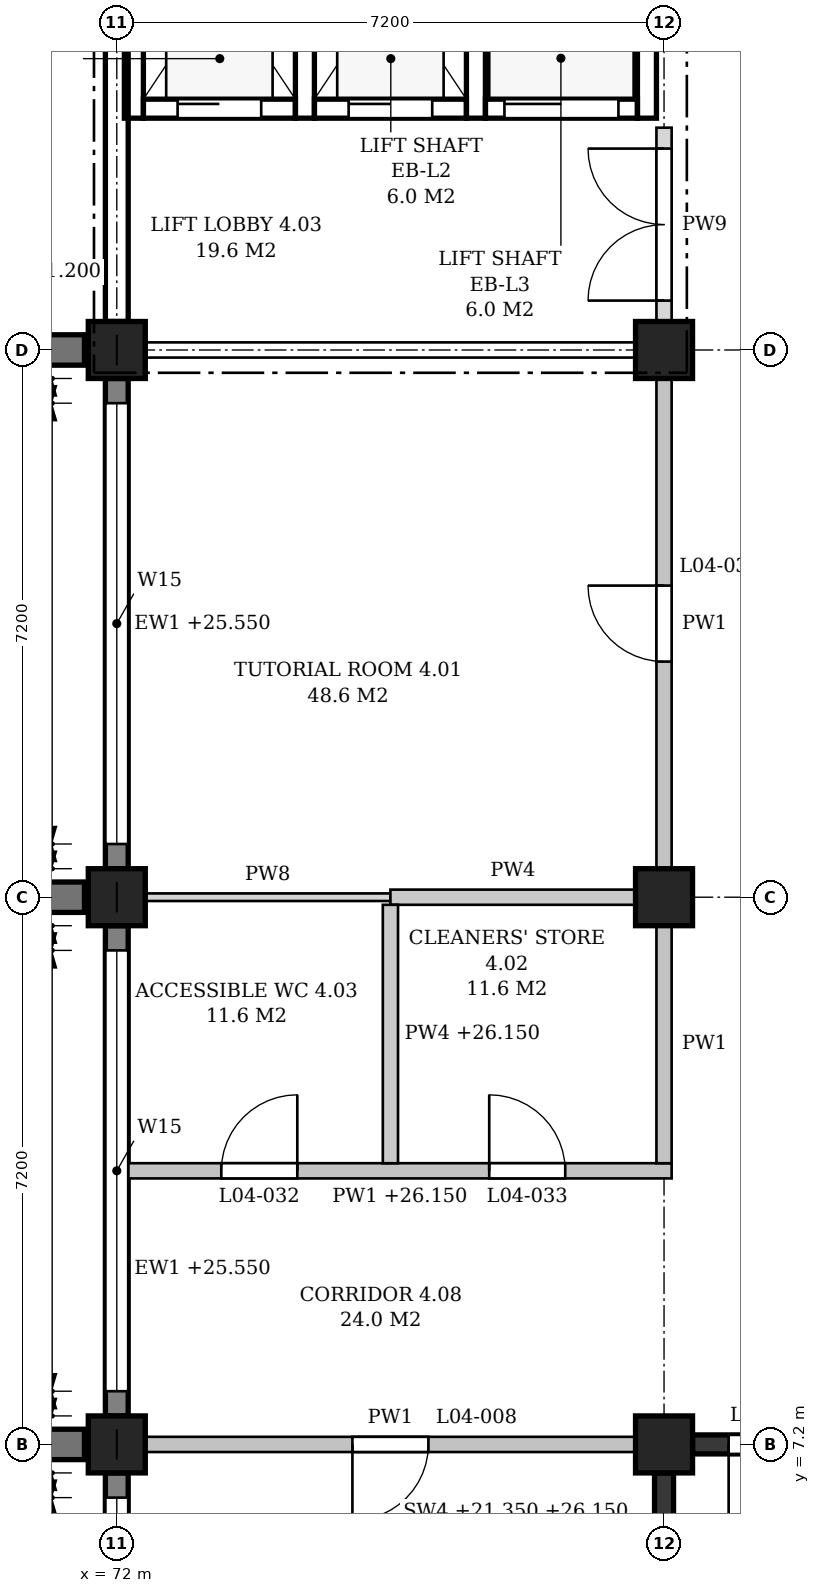
"""IFC4 building model, lengths in metres.
Left out: names, types, materials, properties, quantities, classifications, styles, units other than length and angle.
Written with IfcOpenShell. Run it as: python <this file> out.ifc"""

import sys

from ifc_helpers import new_model, si_unit, direction, frame, frame_2d, origin, origin_2d, place, context, subcontext, project, spatial, polyline, rectangle, outline, extrude, element, fill, save


model = new_model("IFC4")
c1 = context("Model", 3, precision=1e-05, world=origin(), true_north=direction((0.0, 1.0)))
c2 = subcontext(c1, "Body", "Model", "MODEL_VIEW")
j1 = project(units=[si_unit("LENGTHUNIT", "METRE"), si_unit("PLANEANGLEUNIT", "RADIAN")], contexts=[c1])
p1 = place(None, origin())
s1 = spatial("IfcSite", under=j1, at=p1, CompositionType="ELEMENT")
p2 = place(p1, origin())
s2 = spatial("IfcBuilding", under=s1, at=p2, CompositionType="ELEMENT")
p3 = place(p2, frame((0.0, 0.0, 21.6)))
s3 = spatial("IfcBuildingStorey", under=s2, at=p3, CompositionType="ELEMENT", Elevation=21.6)
for number, where, z_axis, x_axis in (
    (1, (72.0, 7.2, 0.0), (0.0, 0.0, 1.0), (1.0, 0.0, 0.0)),
    (2, (72.0, 14.4, 0.0), (0.0, 0.0, 1.0), (1.0, 0.0, 0.0)),
    (3, (72.0, 21.6, 0.0), (0.0, 0.0, 1.0), (1.0, 0.0, 0.0)),
    (4, (79.2, 7.2, 0.0), (0.0, 0.0, 1.0), (1.0, 0.0, 0.0)),
    (5, (79.2, 14.4, 0.0), (0.0, 0.0, 1.0), (1.0, 0.0, 0.0)),
    (6, (79.2, 21.6, 0.0), (0.0, 0.0, 1.0), (1.0, 0.0, 0.0)),
):
    element("IfcColumn", number, at=place(p3, frame(where, z_axis=z_axis, x_axis=x_axis)), inside=s3, PredefinedType="COLUMN", context=c2, shape_type="SweptSolid", body=[
        extrude(rectangle(XDim=0.75, YDim=0.75, at=origin_2d()), origin(), (0.0, 0.0, 1.0), 4.8),
    ])
p4 = place(p3, frame((72.0, 0.375, 0.0), z_axis=(0.0, 0.0, 1.0), x_axis=(0.0, 1.0, 0.0)))
e7 = element("IfcWall", 7, at=p4, inside=s3, PredefinedType="STANDARD", context=c2, shape_type="SweptSolid", body=[
    extrude(rectangle(XDim=6.45, YDim=0.3, at=frame_2d((3.225, 0.0))), origin(), (0.0, 0.0, 1.0), 3.95),
])
p5 = place(p4, frame((0.325, 0.0, 0.9)))
e8 = element("IfcOpeningElement", 8, at=p5, cuts=e7, PredefinedType="OPENING", context=c2, shape_type="SweptSolid", body=[
    extrude(outline(polyline([(0.0, 0.0), (5.8, 0.0), (5.8, 1.0), (2.9, 2.5), (0.0, 1.0), (0.0, 0.0)])), frame((0.0, 0.16, 0.0), z_axis=(0.0, -1.0, 0.0), x_axis=(1.0, 0.0, 0.0)), (0.0, 0.0, 1.0), 0.32),
])
p6 = place(p3, frame((72.0, 7.575, 0.0), z_axis=(0.0, 0.0, 1.0), x_axis=(0.0, 1.0, 0.0)))
e9 = element("IfcWall", 9, at=p6, inside=s3, PredefinedType="STANDARD", context=c2, shape_type="SweptSolid", body=[
    extrude(rectangle(XDim=6.45, YDim=0.3, at=frame_2d((3.225, 0.0))), origin(), (0.0, 0.0, 1.0), 3.95),
])
p7 = place(p6, frame((0.325, 0.0, 0.9)))
e10 = element("IfcOpeningElement", 10, at=p7, cuts=e9, PredefinedType="OPENING", context=c2, shape_type="SweptSolid", body=[
    extrude(outline(polyline([(0.0, 0.0), (5.8, 0.0), (5.8, 1.0), (2.9, 2.5), (0.0, 1.0), (0.0, 0.0)])), frame((0.0, 0.16, 0.0), z_axis=(0.0, -1.0, 0.0), x_axis=(1.0, 0.0, 0.0)), (0.0, 0.0, 1.0), 0.32),
])
p8 = place(p3, frame((72.0, 14.775, 0.0), z_axis=(0.0, 0.0, 1.0), x_axis=(0.0, 1.0, 0.0)))
e11 = element("IfcWall", 11, at=p8, inside=s3, PredefinedType="STANDARD", context=c2, shape_type="SweptSolid", body=[
    extrude(rectangle(XDim=6.45, YDim=0.3, at=frame_2d((3.225, 0.0))), origin(), (0.0, 0.0, 1.0), 3.95),
])
p9 = place(p8, frame((0.325, 0.0, 0.9)))
e12 = element("IfcOpeningElement", 12, at=p9, cuts=e11, PredefinedType="OPENING", context=c2, shape_type="SweptSolid", body=[
    extrude(outline(polyline([(0.0, 0.0), (5.8, 0.0), (5.8, 1.0), (2.9, 2.5), (0.0, 1.0), (0.0, 0.0)])), frame((0.0, 0.16, 0.0), z_axis=(0.0, -1.0, 0.0), x_axis=(1.0, 0.0, 0.0)), (0.0, 0.0, 1.0), 0.32),
])
p10 = place(p3, frame((72.0, 21.975, 0.0), z_axis=(0.0, 0.0, 1.0), x_axis=(0.0, 1.0, 0.0)))
e13 = element("IfcWall", 13, at=p10, inside=s3, PredefinedType="STANDARD", context=c2, shape_type="SweptSolid", body=[
    extrude(rectangle(XDim=6.45, YDim=0.3, at=frame_2d((3.225, 0.0))), origin(), (0.0, 0.0, 1.0), 3.95),
])
for number, where, z_axis, x_axis in (
    (14, (71.575, 7.2, -0.25), (0.0, 0.0, 1.0), (-1.0, 0.0, 0.0)),
    (15, (71.575, 14.4, -0.25), (0.0, 0.0, 1.0), (-1.0, 0.0, 0.0)),
    (16, (71.575, 21.6, -0.25), (0.0, 0.0, 1.0), (-1.0, 0.0, 0.0)),
):
    element("IfcWall", number, at=place(p3, frame(where, z_axis=z_axis, x_axis=x_axis)), inside=s3, PredefinedType="POLYGONAL", context=c2, shape_type="SweptSolid", body=[
        extrude(outline(polyline([(0.6, 0.0), (0.6, 9.175), (0.15, 9.85), (0.0, 9.85), (0.0, 0.0), (0.6, 0.0)])), frame((0.0, 0.2, 0.0), z_axis=(0.0, -1.0, 0.0), x_axis=(1.0, 0.0, 0.0)), (0.0, 0.0, 1.0), 0.4),
    ])
p11 = place(p3, frame((79.575, 7.2, 0.0), z_axis=(0.0, 0.0, 1.0), x_axis=(1.0, 0.0, 0.0)))
e17 = element("IfcWall", 17, at=p11, inside=s3, PredefinedType="SHEAR", context=c2, shape_type="SweptSolid", body=[
    extrude(rectangle(XDim=6.45, YDim=0.25, at=frame_2d((3.225, 0.0))), origin(), (0.0, 0.0, 1.0), 3.8),
])
p12 = place(p11, frame((0.475, 0.0, 0.0)))
e18 = element("IfcOpeningElement", 18, at=p12, cuts=e17, PredefinedType="OPENING", context=c2, shape_type="SweptSolid", body=[
    extrude(rectangle(XDim=1.1, YDim=2.1, at=frame_2d((0.55, 1.05))), frame((0.0, 0.135, 0.0), z_axis=(0.0, -1.0, 0.0), x_axis=(1.0, 0.0, 0.0)), (0.0, 0.0, 1.0), 0.27),
])
p13 = place(p3, frame((79.2, 0.375, 0.0), z_axis=(0.0, 0.0, 1.0), x_axis=(0.0, 1.0, 0.0)))
e19 = element("IfcWall", 19, at=p13, inside=s3, PredefinedType="SHEAR", context=c2, shape_type="SweptSolid", body=[
    extrude(rectangle(XDim=6.45, YDim=0.25, at=frame_2d((3.225, 0.0))), origin(), (0.0, 0.0, 1.0), 3.8),
])
p14 = place(p3, frame((72.225, 24.65, -0.25), z_axis=(0.0, 0.0, 1.0), x_axis=(0.0, 1.0, 0.0)))
e20 = element("IfcWall", 20, at=p14, inside=s3, PredefinedType="SHEAR", context=c2, shape_type="SweptSolid", body=[
    extrude(rectangle(XDim=3.775, YDim=0.25, at=frame_2d((1.888, 0.0))), origin(), (0.0, 0.0, 1.0), 4.8),
])
for number, where, z_axis, x_axis in (
    (21, (74.475, 24.65, -0.25), (0.0, 0.0, 1.0), (0.0, 1.0, 0.0)),
    (22, (76.725, 24.65, -0.25), (0.0, 0.0, 1.0), (0.0, 1.0, 0.0)),
):
    element("IfcWall", number, at=place(p3, frame(where, z_axis=z_axis, x_axis=x_axis)), inside=s3, PredefinedType="SHEAR", context=c2, shape_type="SweptSolid", body=[
        extrude(rectangle(XDim=3.5, YDim=0.25, at=frame_2d((1.75, 0.0))), origin(), (0.0, 0.0, 1.0), 4.8),
    ])
p15 = place(p3, frame((78.975, 24.65, -0.25), z_axis=(0.0, 0.0, 1.0), x_axis=(0.0, 1.0, 0.0)))
e23 = element("IfcWall", 23, at=p15, inside=s3, PredefinedType="SHEAR", context=c2, shape_type="SweptSolid", body=[
    extrude(rectangle(XDim=3.775, YDim=0.25, at=frame_2d((1.888, 0.0))), origin(), (0.0, 0.0, 1.0), 4.8),
])
p16 = place(p3, frame((72.35, 24.775, -0.25), z_axis=(0.0, 0.0, 1.0), x_axis=(1.0, 0.0, 0.0)))
e24 = element("IfcWall", 24, at=p16, inside=s3, PredefinedType="SHEAR", context=c2, shape_type="SweptSolid", body=[
    extrude(rectangle(XDim=2.0, YDim=0.25, at=frame_2d((1.0, 0.0))), origin(), (0.0, 0.0, 1.0), 4.8),
])
p17 = place(p16, frame((0.45, 0.0, 0.25)))
e25 = element("IfcOpeningElement", 25, at=p17, cuts=e24, PredefinedType="OPENING", context=c2, shape_type="SweptSolid", body=[
    extrude(rectangle(XDim=1.1, YDim=2.1, at=frame_2d((0.55, 1.05))), frame((0.0, 0.135, 0.0), z_axis=(0.0, -1.0, 0.0), x_axis=(1.0, 0.0, 0.0)), (0.0, 0.0, 1.0), 0.27),
])
p18 = place(p3, frame((74.6, 24.775, -0.25), z_axis=(0.0, 0.0, 1.0), x_axis=(1.0, 0.0, 0.0)))
e26 = element("IfcWall", 26, at=p18, inside=s3, PredefinedType="SHEAR", context=c2, shape_type="SweptSolid", body=[
    extrude(rectangle(XDim=2.0, YDim=0.25, at=frame_2d((1.0, 0.0))), origin(), (0.0, 0.0, 1.0), 4.8),
])
p19 = place(p18, frame((0.45, 0.0, 0.25)))
e27 = element("IfcOpeningElement", 27, at=p19, cuts=e26, PredefinedType="OPENING", context=c2, shape_type="SweptSolid", body=[
    extrude(rectangle(XDim=1.1, YDim=2.1, at=frame_2d((0.55, 1.05))), frame((0.0, 0.135, 0.0), z_axis=(0.0, -1.0, 0.0), x_axis=(1.0, 0.0, 0.0)), (0.0, 0.0, 1.0), 0.27),
])
p20 = place(p3, frame((76.85, 24.775, -0.25), z_axis=(0.0, 0.0, 1.0), x_axis=(1.0, 0.0, 0.0)))
e28 = element("IfcWall", 28, at=p20, inside=s3, PredefinedType="SHEAR", context=c2, shape_type="SweptSolid", body=[
    extrude(rectangle(XDim=2.0, YDim=0.25, at=frame_2d((1.0, 0.0))), origin(), (0.0, 0.0, 1.0), 4.8),
])
p21 = place(p20, frame((0.25, 0.0, 0.25)))
e29 = element("IfcOpeningElement", 29, at=p21, cuts=e28, PredefinedType="OPENING", context=c2, shape_type="SweptSolid", body=[
    extrude(rectangle(XDim=1.5, YDim=2.1, at=frame_2d((0.75, 1.05))), frame((0.0, 0.135, 0.0), z_axis=(0.0, -1.0, 0.0), x_axis=(1.0, 0.0, 0.0)), (0.0, 0.0, 1.0), 0.27),
])
p22 = place(p3, frame((72.375, 7.2, 0.0), z_axis=(0.0, 0.0, 1.0), x_axis=(1.0, 0.0, 0.0)))
e30 = element("IfcWall", 30, at=p22, inside=s3, PredefinedType="PARTITIONING", context=c2, shape_type="SweptSolid", body=[
    extrude(rectangle(XDim=6.45, YDim=0.2, at=frame_2d((3.225, 0.0))), origin(), (0.0, 0.0, 1.0), 3.8),
])
p23 = place(p22, frame((2.725, 0.0, 0.0)))
e31 = element("IfcOpeningElement", 31, at=p23, cuts=e30, PredefinedType="OPENING", context=c2, shape_type="SweptSolid", body=[
    extrude(rectangle(XDim=1.0, YDim=2.1, at=frame_2d((0.5, 1.05))), frame((0.0, 0.11, 0.0), z_axis=(0.0, -1.0, 0.0), x_axis=(1.0, 0.0, 0.0)), (0.0, 0.0, 1.0), 0.22),
])
p24 = place(p3, frame((72.15, 10.8, 0.0), z_axis=(0.0, 0.0, 1.0), x_axis=(1.0, 0.0, 0.0)))
e32 = element("IfcWall", 32, at=p24, inside=s3, PredefinedType="PARTITIONING", context=c2, shape_type="SweptSolid", body=[
    extrude(outline(polyline([(0.0, 0.0), (7.15, 0.0), (7.15, 3.8), (6.8, 3.8), (6.8, 4.55), (0.1, 4.55), (0.1, 3.95), (0.0, 3.95), (0.0, 0.0)])), frame((0.0, 0.1, 0.0), z_axis=(0.0, -1.0, 0.0), x_axis=(1.0, 0.0, 0.0)), (0.0, 0.0, 1.0), 0.2),
])
p25 = place(p24, frame((1.225, 0.0, 0.0)))
e33 = element("IfcOpeningElement", 33, at=p25, cuts=e32, PredefinedType="OPENING", context=c2, shape_type="SweptSolid", body=[
    extrude(rectangle(XDim=1.0, YDim=2.1, at=frame_2d((0.5, 1.05))), frame((0.0, 0.11, 0.0), z_axis=(0.0, -1.0, 0.0), x_axis=(1.0, 0.0, 0.0)), (0.0, 0.0, 1.0), 0.22),
])
p26 = place(p24, frame((4.75, 0.0, 0.0)))
e34 = element("IfcOpeningElement", 34, at=p26, cuts=e32, PredefinedType="OPENING", context=c2, shape_type="SweptSolid", body=[
    extrude(rectangle(XDim=1.0, YDim=2.1, at=frame_2d((0.5, 1.05))), frame((0.0, 0.11, 0.0), z_axis=(0.0, -1.0, 0.0), x_axis=(1.0, 0.0, 0.0)), (0.0, 0.0, 1.0), 0.22),
])
p27 = place(p3, frame((72.375, 14.4, 0.0), z_axis=(0.0, 0.0, 1.0), x_axis=(1.0, 0.0, 0.0)))
e35 = element("IfcWall", 35, at=p27, inside=s3, PredefinedType="PARTITIONING", context=c2, shape_type="SweptSolid", body=[
    extrude(rectangle(XDim=3.225, YDim=0.1, at=frame_2d((1.613, 0.0))), origin(), (0.0, 0.0, 1.0), 3.8),
])
p28 = place(p3, frame((75.6, 14.4, 0.0), z_axis=(0.0, 0.0, 1.0), x_axis=(1.0, 0.0, 0.0)))
e36 = element("IfcWall", 36, at=p28, inside=s3, PredefinedType="PARTITIONING", context=c2, shape_type="SweptSolid", body=[
    extrude(rectangle(XDim=3.225, YDim=0.2, at=frame_2d((1.612, 0.0))), origin(), (0.0, 0.0, 1.0), 3.8),
])
p29 = place(p3, frame((72.375, 21.6, 0.0), z_axis=(0.0, 0.0, 1.0), x_axis=(1.0, 0.0, 0.0)))
e37 = element("IfcWall", 37, at=p29, inside=s3, PredefinedType="PARTITIONING", context=c2, shape_type="SweptSolid", body=[
    extrude(rectangle(XDim=6.45, YDim=0.2, at=frame_2d((3.225, 0.0))), origin(), (0.0, 0.0, 1.0), 3.8),
])
p30 = place(p3, frame((75.6, 10.9, 0.0), z_axis=(0.0, 0.0, 1.0), x_axis=(0.0, 1.0, 0.0)))
e38 = element("IfcWall", 38, at=p30, inside=s3, PredefinedType="PARTITIONING", context=c2, shape_type="SweptSolid", body=[
    extrude(outline(polyline([(0.0, 0.0), (3.4, 0.0), (3.4, 3.8), (3.25, 3.8), (3.25, 4.55), (0.0, 4.55), (0.0, 0.0)])), frame((0.0, 0.1, 0.0), z_axis=(0.0, -1.0, 0.0), x_axis=(1.0, 0.0, 0.0)), (0.0, 0.0, 1.0), 0.2),
])
p31 = place(p3, frame((79.2, 10.9, 0.0), z_axis=(0.0, 0.0, 1.0), x_axis=(0.0, 1.0, 0.0)))
e39 = element("IfcWall", 39, at=p31, inside=s3, PredefinedType="PARTITIONING", context=c2, shape_type="SweptSolid", body=[
    extrude(rectangle(XDim=3.125, YDim=0.2, at=frame_2d((1.562, 0.0))), origin(), (0.0, 0.0, 1.0), 3.8),
])
p32 = place(p3, frame((79.2, 14.775, 0.0), z_axis=(0.0, 0.0, 1.0), x_axis=(0.0, 1.0, 0.0)))
e40 = element("IfcWall", 40, at=p32, inside=s3, PredefinedType="PARTITIONING", context=c2, shape_type="SweptSolid", body=[
    extrude(rectangle(XDim=6.45, YDim=0.2, at=frame_2d((3.225, 0.0))), origin(), (0.0, 0.0, 1.0), 3.8),
])
p33 = place(p32, frame((2.725, 0.0, 0.0)))
e41 = element("IfcOpeningElement", 41, at=p33, cuts=e40, PredefinedType="OPENING", context=c2, shape_type="SweptSolid", body=[
    extrude(rectangle(XDim=1.0, YDim=2.1, at=frame_2d((0.5, 1.05))), frame((0.0, 0.11, 0.0), z_axis=(0.0, -1.0, 0.0), x_axis=(1.0, 0.0, 0.0)), (0.0, 0.0, 1.0), 0.22),
])
p34 = place(p3, frame((79.2, 21.975, 0.0), z_axis=(0.0, 0.0, 1.0), x_axis=(0.0, 1.0, 0.0)))
e42 = element("IfcWall", 42, at=p34, inside=s3, PredefinedType="PARTITIONING", context=c2, shape_type="SweptSolid", body=[
    extrude(rectangle(XDim=2.55, YDim=0.2, at=frame_2d((1.275, 0.0))), origin(), (0.0, 0.0, 1.0), 3.8),
])
p35 = place(p34, frame((0.275, 0.0, 0.0)))
e43 = element("IfcOpeningElement", 43, at=p35, cuts=e42, PredefinedType="OPENING", context=c2, shape_type="SweptSolid", body=[
    extrude(rectangle(XDim=2.0, YDim=2.4, at=frame_2d((1.0, 1.2))), frame((0.0, 0.11, 0.0), z_axis=(0.0, -1.0, 0.0), x_axis=(1.0, 0.0, 0.0)), (0.0, 0.0, 1.0), 0.22),
])
p36 = place(p5, origin())
e44 = element("IfcWindow", 44, at=p36, inside=s3, PartitioningType="TRIPLE_PANEL_VERTICAL", PredefinedType="WINDOW", context=c2, shape_type="SweptSolid", body=[
    extrude(outline(polyline([(0.0, 0.0), (5.8, 0.0), (5.8, 1.0), (2.9, 2.5), (0.0, 1.0), (0.0, 0.0)])), frame((0.0, 0.03, 0.0), z_axis=(0.0, -1.0, 0.0), x_axis=(1.0, 0.0, 0.0)), (0.0, 0.0, 1.0), 0.06),
])
fill(e8, e44)
p37 = place(p7, origin())
e45 = element("IfcWindow", 45, at=p37, inside=s3, PartitioningType="TRIPLE_PANEL_VERTICAL", PredefinedType="WINDOW", context=c2, shape_type="SweptSolid", body=[
    extrude(outline(polyline([(0.0, 0.0), (5.8, 0.0), (5.8, 1.0), (2.9, 2.5), (0.0, 1.0), (0.0, 0.0)])), frame((0.0, 0.03, 0.0), z_axis=(0.0, -1.0, 0.0), x_axis=(1.0, 0.0, 0.0)), (0.0, 0.0, 1.0), 0.06),
])
fill(e10, e45)
p38 = place(p9, origin())
e46 = element("IfcWindow", 46, at=p38, inside=s3, PartitioningType="TRIPLE_PANEL_VERTICAL", PredefinedType="WINDOW", context=c2, shape_type="SweptSolid", body=[
    extrude(outline(polyline([(0.0, 0.0), (5.8, 0.0), (5.8, 1.0), (2.9, 2.5), (0.0, 1.0), (0.0, 0.0)])), frame((0.0, 0.03, 0.0), z_axis=(0.0, -1.0, 0.0), x_axis=(1.0, 0.0, 0.0)), (0.0, 0.0, 1.0), 0.06),
])
fill(e12, e46)
p39 = place(p12, frame((1.1, 0.0, 0.0), z_axis=(0.0, 0.0, 1.0), x_axis=(-1.0, 0.0, 0.0)))
e47 = element("IfcDoor", 47, at=p39, inside=s3, OperationType="SINGLE_SWING_RIGHT", PredefinedType="DOOR", context=c2, shape_type="SweptSolid", body=[
    extrude(rectangle(XDim=1.1, YDim=2.1, at=frame_2d((0.55, 1.05))), frame((0.0, 0.025, 0.0), z_axis=(0.0, -1.0, 0.0), x_axis=(1.0, 0.0, 0.0)), (0.0, 0.0, 1.0), 0.05),
])
fill(e18, e47)
p40 = place(p17, origin())
e48 = element("IfcDoor", 48, at=p40, inside=s3, OperationType="SLIDING_TO_LEFT", PredefinedType="DOOR", context=c2, shape_type="SweptSolid", body=[
    extrude(rectangle(XDim=1.1, YDim=2.1, at=frame_2d((0.55, 1.05))), frame((0.0, 0.025, 0.0), z_axis=(0.0, -1.0, 0.0), x_axis=(1.0, 0.0, 0.0)), (0.0, 0.0, 1.0), 0.05),
])
fill(e25, e48)
p41 = place(p19, origin())
e49 = element("IfcDoor", 49, at=p41, inside=s3, OperationType="SLIDING_TO_LEFT", PredefinedType="DOOR", context=c2, shape_type="SweptSolid", body=[
    extrude(rectangle(XDim=1.1, YDim=2.1, at=frame_2d((0.55, 1.05))), frame((0.0, 0.025, 0.0), z_axis=(0.0, -1.0, 0.0), x_axis=(1.0, 0.0, 0.0)), (0.0, 0.0, 1.0), 0.05),
])
fill(e27, e49)
p42 = place(p21, origin())
e50 = element("IfcDoor", 50, at=p42, inside=s3, OperationType="SLIDING_TO_LEFT", PredefinedType="DOOR", context=c2, shape_type="SweptSolid", body=[
    extrude(rectangle(XDim=1.5, YDim=2.1, at=frame_2d((0.75, 1.05))), frame((0.0, 0.025, 0.0), z_axis=(0.0, -1.0, 0.0), x_axis=(1.0, 0.0, 0.0)), (0.0, 0.0, 1.0), 0.05),
])
fill(e29, e50)
p43 = place(p35, origin())
e51 = element("IfcDoor", 51, at=p43, inside=s3, OperationType="DOUBLE_DOOR_SINGLE_SWING", PredefinedType="DOOR", context=c2, shape_type="SweptSolid", body=[
    extrude(rectangle(XDim=2.0, YDim=2.4, at=frame_2d((1.0, 1.2))), frame((0.0, 0.025, 0.0), z_axis=(0.0, -1.0, 0.0), x_axis=(1.0, 0.0, 0.0)), (0.0, 0.0, 1.0), 0.05),
])
fill(e43, e51)
p44 = place(p23, frame((1.0, 0.0, 0.0), z_axis=(0.0, 0.0, 1.0), x_axis=(-1.0, 0.0, 0.0)))
e52 = element("IfcDoor", 52, at=p44, inside=s3, OperationType="SINGLE_SWING_RIGHT", PredefinedType="DOOR", context=c2, shape_type="SweptSolid", body=[
    extrude(rectangle(XDim=1.0, YDim=2.1, at=frame_2d((0.5, 1.05))), frame((0.0, 0.025, 0.0), z_axis=(0.0, -1.0, 0.0), x_axis=(1.0, 0.0, 0.0)), (0.0, 0.0, 1.0), 0.05),
])
fill(e31, e52)
p45 = place(p25, origin())
e53 = element("IfcDoor", 53, at=p45, inside=s3, OperationType="SINGLE_SWING_RIGHT", PredefinedType="DOOR", context=c2, shape_type="SweptSolid", body=[
    extrude(rectangle(XDim=1.0, YDim=2.1, at=frame_2d((0.5, 1.05))), frame((0.0, 0.025, 0.0), z_axis=(0.0, -1.0, 0.0), x_axis=(1.0, 0.0, 0.0)), (0.0, 0.0, 1.0), 0.05),
])
fill(e33, e53)
p46 = place(p26, origin())
e54 = element("IfcDoor", 54, at=p46, inside=s3, OperationType="SINGLE_SWING_LEFT", PredefinedType="DOOR", context=c2, shape_type="SweptSolid", body=[
    extrude(rectangle(XDim=1.0, YDim=2.1, at=frame_2d((0.5, 1.05))), frame((0.0, 0.025, 0.0), z_axis=(0.0, -1.0, 0.0), x_axis=(1.0, 0.0, 0.0)), (0.0, 0.0, 1.0), 0.05),
])
fill(e34, e54)
p47 = place(p33, origin())
e55 = element("IfcDoor", 55, at=p47, inside=s3, OperationType="SINGLE_SWING_RIGHT", PredefinedType="DOOR", context=c2, shape_type="SweptSolid", body=[
    extrude(rectangle(XDim=1.0, YDim=2.1, at=frame_2d((0.5, 1.05))), frame((0.0, 0.025, 0.0), z_axis=(0.0, -1.0, 0.0), x_axis=(1.0, 0.0, 0.0)), (0.0, 0.0, 1.0), 0.05),
])
fill(e41, e55)
save(model, sys.argv[1])
